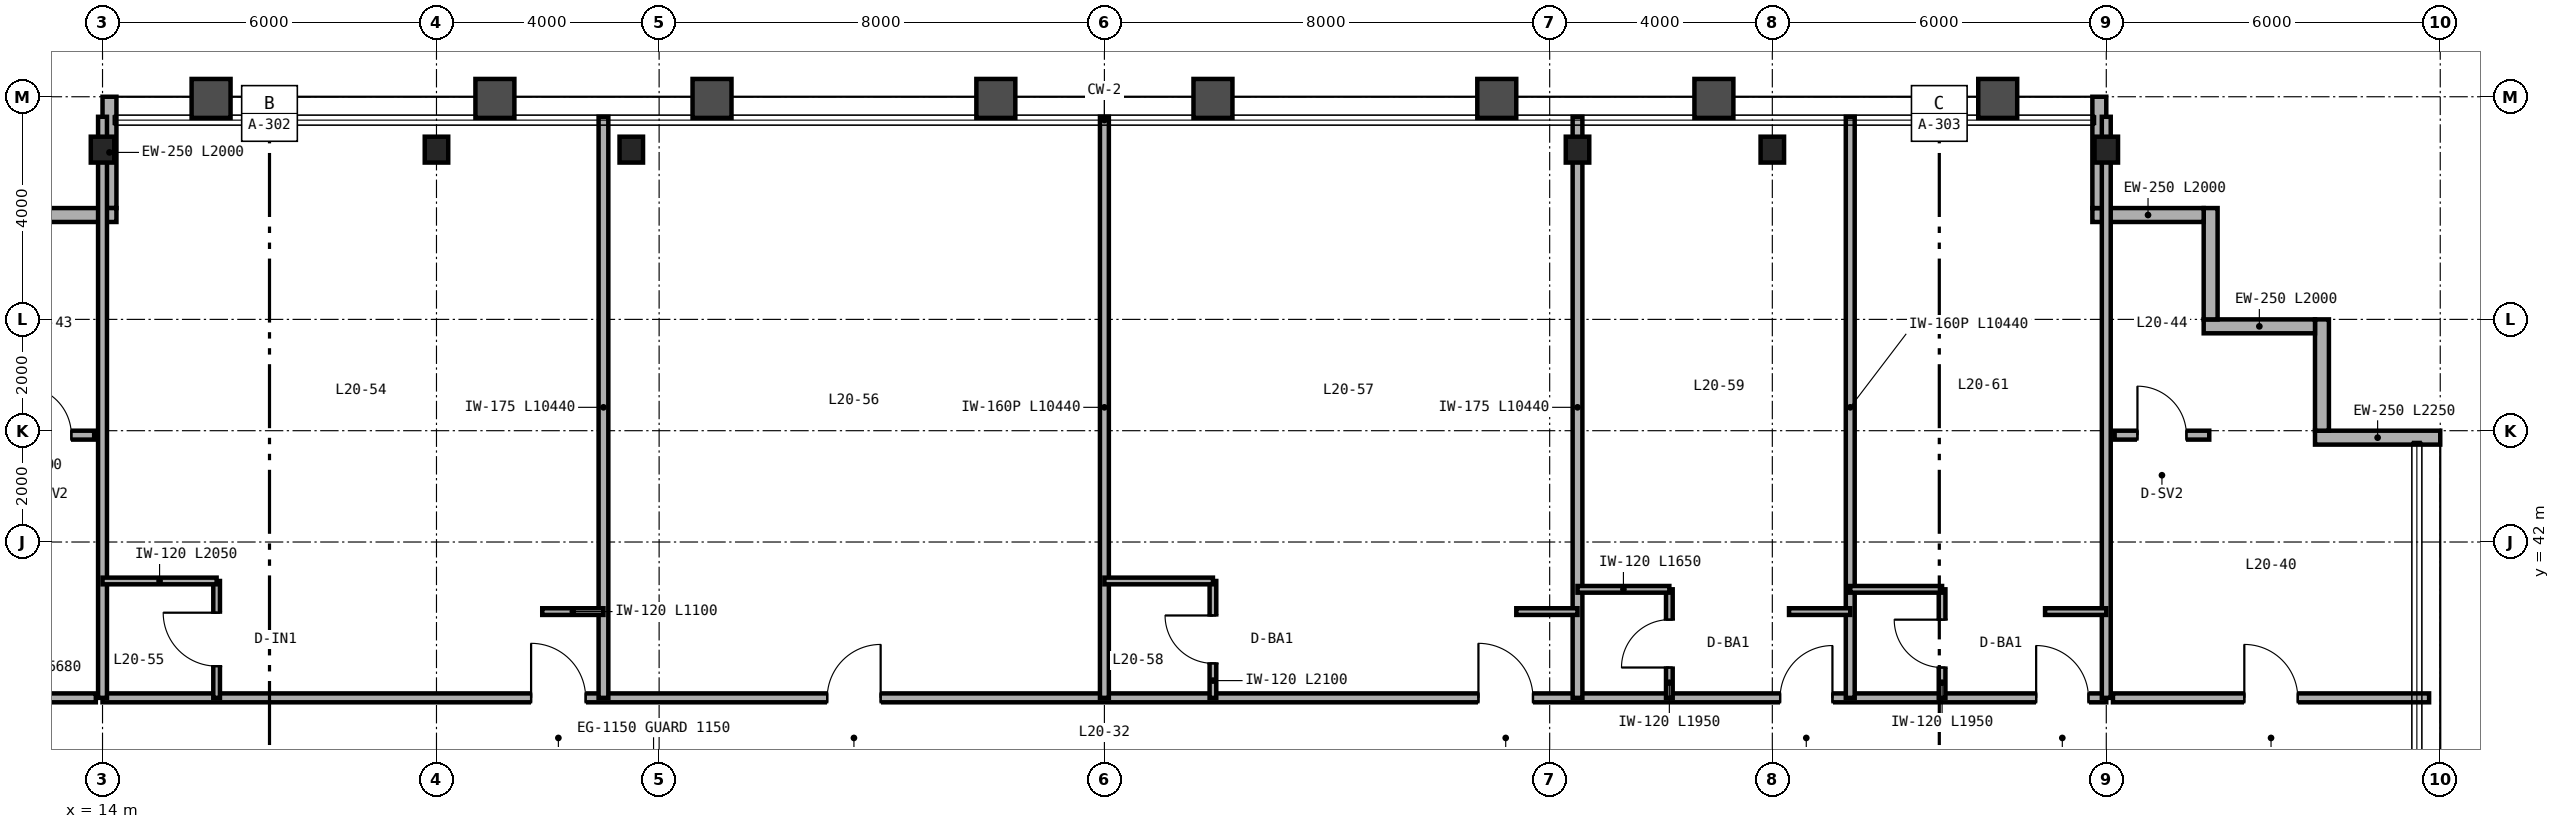
"""IFC4 building model, lengths in metres.
Left out: names, types, materials, properties, quantities, classifications, styles, units other than length and angle.
Written with IfcOpenShell. Run it as: python <this file> out.ifc"""

import sys

from ifc_helpers import new_model, si_unit, direction, frame, frame_2d, origin, origin_2d, place, context, subcontext, project, spatial, rectangle, i_section, extrude, source, transform, mapped, element, fill, save


model = new_model("IFC4")
c1 = context("Model", 3, precision=1e-05, world=origin(), true_north=direction((0.0, 1.0)))
c2 = subcontext(c1, "Body", "Model", "MODEL_VIEW")
j1 = project(units=[si_unit("LENGTHUNIT", "METRE"), si_unit("PLANEANGLEUNIT", "RADIAN")], contexts=[c1])
p1 = place(None, origin())
s1 = spatial("IfcSite", under=j1, at=p1, CompositionType="ELEMENT")
p2 = place(p1, origin())
s2 = spatial("IfcBuilding", under=s1, at=p2, CompositionType="ELEMENT")
p3 = place(p2, frame((0.0, 0.0, 81.6)))
s3 = spatial("IfcBuildingStorey", under=s2, at=p3, CompositionType="ELEMENT", Elevation=81.6)
m1 = source(origin(), c2, "Body", "SweptSolid", [
    extrude(i_section(OverallWidth=0.422, OverallDepth=0.465, WebThickness=0.045, FlangeThickness=0.073, FilletRadius=0.025, at=origin_2d()), origin(), (0.0, 0.0, 1.0), 3.28),
])
for number, where, z_axis, x_axis in (
    (1, (14.0, 49.05, 0.0), (0.0, 0.0, 1.0), (1.0, 0.0, 0.0)),
    (2, (20.0, 49.05, 0.0), (0.0, 0.0, 1.0), (1.0, 0.0, 0.0)),
    (3, (23.5, 49.05, 0.0), (0.0, 0.0, 1.0), (1.0, 0.0, 0.0)),
    (4, (40.5, 49.05, 0.0), (0.0, 0.0, 1.0), (1.0, 0.0, 0.0)),
    (5, (44.0, 49.05, 0.0), (0.0, 0.0, 1.0), (1.0, 0.0, 0.0)),
    (6, (50.0, 49.05, 0.0), (0.0, 0.0, 1.0), (1.0, 0.0, 0.0)),
):
    element("IfcColumn", number, at=place(p3, frame(where, z_axis=z_axis, x_axis=x_axis)), inside=s3, PredefinedType="COLUMN", context=c2, shape_type="MappedRepresentation", body=[
        mapped(m1, transform((0.0, 0.0, 0.0), scale=1.0)),
    ])
p4 = place(p3, frame((56.0, 43.875, 0.0), z_axis=(0.0, 0.0, 1.0), x_axis=(-1.0, 0.0, 0.0)))
e7 = element("IfcWall", 7, at=p4, inside=s3, PredefinedType="SOLIDWALL", context=c2, shape_type="SweptSolid", body=[
    extrude(rectangle(XDim=2.25, YDim=0.25, at=frame_2d((1.125, 0.0))), origin(), (0.0, 0.0, 1.0), 3.28),
])
for number, where, z_axis, x_axis in (
    (8, (53.875, 44.0, 0.0), (0.0, 0.0, 1.0), (0.0, 1.0, 0.0)),
    (9, (53.75, 45.875, 0.0), (0.0, 0.0, 1.0), (-1.0, 0.0, 0.0)),
    (10, (51.875, 46.0, 0.0), (0.0, 0.0, 1.0), (0.0, 1.0, 0.0)),
    (11, (51.75, 47.875, 0.0), (0.0, 0.0, 1.0), (-1.0, 0.0, 0.0)),
):
    element("IfcWall", number, at=place(p3, frame(where, z_axis=z_axis, x_axis=x_axis)), inside=s3, PredefinedType="SOLIDWALL", context=c2, shape_type="SweptSolid", body=[
        extrude(rectangle(XDim=2.0, YDim=0.25, at=frame_2d((1.0, 0.0))), origin(), (0.0, 0.0, 1.0), 3.28),
    ])
for number, where, z_axis, x_axis in (
    (12, (49.875, 48.0, 0.0), (0.0, 0.0, 1.0), (0.0, 1.0, 0.0)),
    (13, (14.125, 50.0, 0.0), (0.0, 0.0, 1.0), (0.0, -1.0, 0.0)),
):
    element("IfcWall", number, at=place(p3, frame(where, z_axis=z_axis, x_axis=x_axis)), inside=s3, PredefinedType="SOLIDWALL", context=c2, shape_type="SweptSolid", body=[
        extrude(rectangle(XDim=2.0, YDim=0.25, at=frame_2d((1.0, 0.0))), origin(), (0.0, 0.0, 1.0), 2.587),
    ])
p5 = place(p3, frame((14.25, 47.875, 0.0), z_axis=(0.0, 0.0, 1.0), x_axis=(-1.0, 0.0, 0.0)))
e14 = element("IfcWall", 14, at=p5, inside=s3, PredefinedType="SOLIDWALL", context=c2, shape_type="SweptSolid", body=[
    extrude(rectangle(XDim=2.0, YDim=0.25, at=frame_2d((1.0, 0.0))), origin(), (0.0, 0.0, 1.0), 3.28),
])
p6 = place(p3, frame((8.2, 39.2, 0.0), z_axis=(0.0, 0.0, 1.0), x_axis=(1.0, 0.0, 0.0)))
e15 = element("IfcWall", 15, at=p6, inside=s3, PredefinedType="PARTITIONING", context=c2, shape_type="SweptSolid", body=[
    extrude(rectangle(XDim=5.68, YDim=0.16, at=frame_2d((2.84, 0.0))), origin(), (0.0, 0.0, 1.0), 3.28),
])
p7 = place(p6, frame((2.36, 0.0, 0.0)))
e16 = element("IfcOpeningElement", 16, at=p7, cuts=e15, PredefinedType="OPENING", context=c2, shape_type="SweptSolid", body=[
    extrude(rectangle(XDim=0.96, YDim=2.15, at=frame_2d((0.48, 1.075))), frame((0.0, 0.09, 0.0), z_axis=(0.0, -1.0, 0.0), x_axis=(1.0, 0.0, 0.0)), (0.0, 0.0, 1.0), 0.18),
])
p8 = place(p3, frame((50.12, 39.2, 0.0), z_axis=(0.0, 0.0, 1.0), x_axis=(1.0, 0.0, 0.0)))
e17 = element("IfcWall", 17, at=p8, inside=s3, PredefinedType="PARTITIONING", context=c2, shape_type="SweptSolid", body=[
    extrude(rectangle(XDim=5.68, YDim=0.16, at=frame_2d((2.84, 0.0))), origin(), (0.0, 0.0, 1.0), 3.28),
])
p9 = place(p8, frame((2.36, 0.0, 0.0)))
e18 = element("IfcOpeningElement", 18, at=p9, cuts=e17, PredefinedType="OPENING", context=c2, shape_type="SweptSolid", body=[
    extrude(rectangle(XDim=0.96, YDim=2.15, at=frame_2d((0.48, 1.075))), frame((0.0, 0.09, 0.0), z_axis=(0.0, -1.0, 0.0), x_axis=(1.0, 0.0, 0.0)), (0.0, 0.0, 1.0), 0.18),
])
p10 = place(p3, frame((12.15, 43.92, 0.0), z_axis=(0.0, 0.0, 1.0), x_axis=(1.0, 0.0, 0.0)))
e19 = element("IfcWall", 19, at=p10, inside=s3, PredefinedType="PARTITIONING", context=c2, shape_type="SweptSolid", body=[
    extrude(rectangle(XDim=1.7, YDim=0.16, at=frame_2d((0.85, 0.0))), origin(), (0.0, 0.0, 1.0), 3.28),
])
p11 = place(p10, frame((0.41, 0.0, 0.0)))
e20 = element("IfcOpeningElement", 20, at=p11, cuts=e19, PredefinedType="OPENING", context=c2, shape_type="SweptSolid", body=[
    extrude(rectangle(XDim=0.88, YDim=2.15, at=frame_2d((0.44, 1.075))), frame((0.0, 0.09, 0.0), z_axis=(0.0, -1.0, 0.0), x_axis=(1.0, 0.0, 0.0)), (0.0, 0.0, 1.0), 0.18),
])
p12 = place(p3, frame((50.15, 43.92, 0.0), z_axis=(0.0, 0.0, 1.0), x_axis=(1.0, 0.0, 0.0)))
e21 = element("IfcWall", 21, at=p12, inside=s3, PredefinedType="PARTITIONING", context=c2, shape_type="SweptSolid", body=[
    extrude(rectangle(XDim=1.7, YDim=0.16, at=frame_2d((0.85, 0.0))), origin(), (0.0, 0.0, 1.0), 3.28),
])
p13 = place(p12, frame((0.41, 0.0, 0.0)))
e22 = element("IfcOpeningElement", 22, at=p13, cuts=e21, PredefinedType="OPENING", context=c2, shape_type="SweptSolid", body=[
    extrude(rectangle(XDim=0.88, YDim=2.15, at=frame_2d((0.44, 1.075))), frame((0.0, 0.09, 0.0), z_axis=(0.0, -1.0, 0.0), x_axis=(1.0, 0.0, 0.0)), (0.0, 0.0, 1.0), 0.18),
])
p14 = place(p3, frame((14.0, 39.2, 0.0), z_axis=(0.0, 0.0, 1.0), x_axis=(1.0, 0.0, 0.0)))
e23 = element("IfcWall", 23, at=p14, inside=s3, PredefinedType="PARTITIONING", context=c2, shape_type="SweptSolid", body=[
    extrude(rectangle(XDim=36.0, YDim=0.16, at=frame_2d((18.0, 0.0))), origin(), (0.0, 0.0, 1.0), 2.501),
])
p15 = place(p14, frame((7.7, 0.0, 0.0)))
e24 = element("IfcOpeningElement", 24, at=p15, cuts=e23, PredefinedType="OPENING", context=c2, shape_type="SweptSolid", body=[
    extrude(rectangle(XDim=0.98, YDim=2.2, at=frame_2d((0.49, 1.1))), frame((0.0, 0.09, 0.0), z_axis=(0.0, -1.0, 0.0), x_axis=(1.0, 0.0, 0.0)), (0.0, 0.0, 1.0), 0.18),
])
p16 = place(p14, frame((13.02, 0.0, 0.0)))
e25 = element("IfcOpeningElement", 25, at=p16, cuts=e23, PredefinedType="OPENING", context=c2, shape_type="SweptSolid", body=[
    extrude(rectangle(XDim=0.96, YDim=2.15, at=frame_2d((0.48, 1.075))), frame((0.0, 0.09, 0.0), z_axis=(0.0, -1.0, 0.0), x_axis=(1.0, 0.0, 0.0)), (0.0, 0.0, 1.0), 0.18),
])
p17 = place(p14, frame((24.72, 0.0, 0.0)))
e26 = element("IfcOpeningElement", 26, at=p17, cuts=e23, PredefinedType="OPENING", context=c2, shape_type="SweptSolid", body=[
    extrude(rectangle(XDim=0.98, YDim=2.2, at=frame_2d((0.49, 1.1))), frame((0.0, 0.09, 0.0), z_axis=(0.0, -1.0, 0.0), x_axis=(1.0, 0.0, 0.0)), (0.0, 0.0, 1.0), 0.18),
])
p18 = place(p14, frame((30.14, 0.0, 0.0)))
e27 = element("IfcOpeningElement", 27, at=p18, cuts=e23, PredefinedType="OPENING", context=c2, shape_type="SweptSolid", body=[
    extrude(rectangle(XDim=0.94, YDim=2.15, at=frame_2d((0.47, 1.075))), frame((0.0, 0.09, 0.0), z_axis=(0.0, -1.0, 0.0), x_axis=(1.0, 0.0, 0.0)), (0.0, 0.0, 1.0), 0.18),
])
p19 = place(p14, frame((34.74, 0.0, 0.0)))
e28 = element("IfcOpeningElement", 28, at=p19, cuts=e23, PredefinedType="OPENING", context=c2, shape_type="SweptSolid", body=[
    extrude(rectangle(XDim=0.94, YDim=2.15, at=frame_2d((0.47, 1.075))), frame((0.0, 0.09, 0.0), z_axis=(0.0, -1.0, 0.0), x_axis=(1.0, 0.0, 0.0)), (0.0, 0.0, 1.0), 0.18),
])
for number, where, z_axis, x_axis in (
    (29, (14.0, 39.2, 0.0), (0.0, 0.0, 1.0), (0.0, 1.0, 0.0)),
    (30, (50.0, 39.2, 0.0), (0.0, 0.0, 1.0), (0.0, 1.0, 0.0)),
):
    element("IfcWall", number, at=place(p3, frame(where, z_axis=z_axis, x_axis=x_axis)), inside=s3, PredefinedType="PARTITIONING", context=c2, shape_type="SweptSolid", body=[
        extrude(rectangle(XDim=10.44, YDim=0.16, at=frame_2d((5.22, 0.0))), origin(), (0.0, 0.0, 1.0), 2.587),
    ])
p20 = place(p3, frame((23.0, 39.2, 0.0), z_axis=(0.0, 0.0, 1.0), x_axis=(0.0, 1.0, 0.0)))
e31 = element("IfcWall", 31, at=p20, inside=s3, PredefinedType="PARTITIONING", context=c2, shape_type="SweptSolid", body=[
    extrude(rectangle(XDim=10.44, YDim=0.175, at=frame_2d((5.22, 0.0))), origin(), (0.0, 0.0, 1.0), 2.743),
])
p21 = place(p3, frame((16.05, 39.2, 0.0), z_axis=(0.0, 0.0, 1.0), x_axis=(0.0, 1.0, 0.0)))
e32 = element("IfcWall", 32, at=p21, inside=s3, PredefinedType="PARTITIONING", context=c2, shape_type="SweptSolid", body=[
    extrude(rectangle(XDim=2.1, YDim=0.12, at=frame_2d((1.05, 0.0))), origin(), (0.0, 0.0, 1.0), 3.28),
])
p22 = place(p21, frame((0.57, 0.0, 0.0)))
e33 = element("IfcOpeningElement", 33, at=p22, cuts=e32, PredefinedType="OPENING", context=c2, shape_type="SweptSolid", body=[
    extrude(rectangle(XDim=0.96, YDim=2.15, at=frame_2d((0.48, 1.075))), frame((0.0, 0.07, 0.0), z_axis=(0.0, -1.0, 0.0), x_axis=(1.0, 0.0, 0.0)), (0.0, 0.0, 1.0), 0.14),
])
p23 = place(p3, frame((14.0, 41.3, 0.0), z_axis=(0.0, 0.0, 1.0), x_axis=(1.0, 0.0, 0.0)))
e34 = element("IfcWall", 34, at=p23, inside=s3, PredefinedType="PARTITIONING", context=c2, shape_type="SweptSolid", body=[
    extrude(rectangle(XDim=2.05, YDim=0.12, at=frame_2d((1.025, 0.0))), origin(), (0.0, 0.0, 1.0), 3.28),
])
p24 = place(p3, frame((21.9, 40.75, 0.0), z_axis=(0.0, 0.0, 1.0), x_axis=(1.0, 0.0, 0.0)))
e35 = element("IfcWall", 35, at=p24, inside=s3, PredefinedType="PARTITIONING", context=c2, shape_type="SweptSolid", body=[
    extrude(rectangle(XDim=1.1, YDim=0.12, at=frame_2d((0.55, 0.0))), origin(), (0.0, 0.0, 1.0), 3.28),
])
p25 = place(p3, frame((32.0, 39.2, 0.0), z_axis=(0.0, 0.0, 1.0), x_axis=(0.0, 1.0, 0.0)))
e36 = element("IfcWall", 36, at=p25, inside=s3, PredefinedType="PARTITIONING", context=c2, shape_type="SweptSolid", body=[
    extrude(rectangle(XDim=10.44, YDim=0.16, at=frame_2d((5.22, 0.0))), origin(), (0.0, 0.0, 1.0), 2.36),
])
p26 = place(p3, frame((40.5, 39.2, 0.0), z_axis=(0.0, 0.0, 1.0), x_axis=(0.0, 1.0, 0.0)))
e37 = element("IfcWall", 37, at=p26, inside=s3, PredefinedType="PARTITIONING", context=c2, shape_type="SweptSolid", body=[
    extrude(rectangle(XDim=10.44, YDim=0.175, at=frame_2d((5.22, 0.0))), origin(), (0.0, 0.0, 1.0), 2.36),
])
p27 = place(p3, frame((33.95, 39.2, 0.0), z_axis=(0.0, 0.0, 1.0), x_axis=(0.0, 1.0, 0.0)))
e38 = element("IfcWall", 38, at=p27, inside=s3, PredefinedType="PARTITIONING", context=c2, shape_type="SweptSolid", body=[
    extrude(rectangle(XDim=2.1, YDim=0.12, at=frame_2d((1.05, 0.0))), origin(), (0.0, 0.0, 1.0), 3.28),
])
p28 = place(p27, frame((0.62, 0.0, 0.0)))
e39 = element("IfcOpeningElement", 39, at=p28, cuts=e38, PredefinedType="OPENING", context=c2, shape_type="SweptSolid", body=[
    extrude(rectangle(XDim=0.86, YDim=2.1, at=frame_2d((0.43, 1.05))), frame((0.0, 0.07, 0.0), z_axis=(0.0, -1.0, 0.0), x_axis=(1.0, 0.0, 0.0)), (0.0, 0.0, 1.0), 0.14),
])
p29 = place(p3, frame((32.0, 41.3, 0.0), z_axis=(0.0, 0.0, 1.0), x_axis=(1.0, 0.0, 0.0)))
e40 = element("IfcWall", 40, at=p29, inside=s3, PredefinedType="PARTITIONING", context=c2, shape_type="SweptSolid", body=[
    extrude(rectangle(XDim=1.95, YDim=0.12, at=frame_2d((0.975, 0.0))), origin(), (0.0, 0.0, 1.0), 3.28),
])
p30 = place(p3, frame((39.4, 40.75, 0.0), z_axis=(0.0, 0.0, 1.0), x_axis=(1.0, 0.0, 0.0)))
e41 = element("IfcWall", 41, at=p30, inside=s3, PredefinedType="PARTITIONING", context=c2, shape_type="SweptSolid", body=[
    extrude(rectangle(XDim=1.1, YDim=0.12, at=frame_2d((0.55, 0.0))), origin(), (0.0, 0.0, 1.0), 2.501),
])
p31 = place(p3, frame((45.4, 39.2, 0.0), z_axis=(0.0, 0.0, 1.0), x_axis=(0.0, 1.0, 0.0)))
e42 = element("IfcWall", 42, at=p31, inside=s3, PredefinedType="PARTITIONING", context=c2, shape_type="SweptSolid", body=[
    extrude(rectangle(XDim=10.44, YDim=0.16, at=frame_2d((5.22, 0.0))), origin(), (0.0, 0.0, 1.0), 2.587),
])
p32 = place(p3, frame((42.15, 39.2, 0.0), z_axis=(0.0, 0.0, 1.0), x_axis=(0.0, 1.0, 0.0)))
e43 = element("IfcWall", 43, at=p32, inside=s3, PredefinedType="PARTITIONING", context=c2, shape_type="SweptSolid", body=[
    extrude(rectangle(XDim=1.95, YDim=0.12, at=frame_2d((0.975, 0.0))), origin(), (0.0, 0.0, 1.0), 3.28),
])
p33 = place(p32, frame((0.545, 0.0, 0.0)))
e44 = element("IfcOpeningElement", 44, at=p33, cuts=e43, PredefinedType="OPENING", context=c2, shape_type="SweptSolid", body=[
    extrude(rectangle(XDim=0.86, YDim=2.1, at=frame_2d((0.43, 1.05))), frame((0.0, 0.07, 0.0), z_axis=(0.0, -1.0, 0.0), x_axis=(1.0, 0.0, 0.0)), (0.0, 0.0, 1.0), 0.14),
])
p34 = place(p3, frame((40.5, 41.15, 0.0), z_axis=(0.0, 0.0, 1.0), x_axis=(1.0, 0.0, 0.0)))
e45 = element("IfcWall", 45, at=p34, inside=s3, PredefinedType="PARTITIONING", context=c2, shape_type="SweptSolid", body=[
    extrude(rectangle(XDim=1.65, YDim=0.12, at=frame_2d((0.825, 0.0))), origin(), (0.0, 0.0, 1.0), 2.501),
])
p35 = place(p3, frame((44.3, 40.75, 0.0), z_axis=(0.0, 0.0, 1.0), x_axis=(1.0, 0.0, 0.0)))
e46 = element("IfcWall", 46, at=p35, inside=s3, PredefinedType="PARTITIONING", context=c2, shape_type="SweptSolid", body=[
    extrude(rectangle(XDim=1.1, YDim=0.12, at=frame_2d((0.55, 0.0))), origin(), (0.0, 0.0, 1.0), 3.28),
])
p36 = place(p3, frame((47.05, 39.2, 0.0), z_axis=(0.0, 0.0, 1.0), x_axis=(0.0, 1.0, 0.0)))
e47 = element("IfcWall", 47, at=p36, inside=s3, PredefinedType="PARTITIONING", context=c2, shape_type="SweptSolid", body=[
    extrude(rectangle(XDim=1.95, YDim=0.12, at=frame_2d((0.975, 0.0))), origin(), (0.0, 0.0, 1.0), 3.28),
])
p37 = place(p36, frame((0.545, 0.0, 0.0)))
e48 = element("IfcOpeningElement", 48, at=p37, cuts=e47, PredefinedType="OPENING", context=c2, shape_type="SweptSolid", body=[
    extrude(rectangle(XDim=0.86, YDim=2.1, at=frame_2d((0.43, 1.05))), frame((0.0, 0.07, 0.0), z_axis=(0.0, -1.0, 0.0), x_axis=(1.0, 0.0, 0.0)), (0.0, 0.0, 1.0), 0.14),
])
p38 = place(p3, frame((45.4, 41.15, 0.0), z_axis=(0.0, 0.0, 1.0), x_axis=(1.0, 0.0, 0.0)))
e49 = element("IfcWall", 49, at=p38, inside=s3, PredefinedType="PARTITIONING", context=c2, shape_type="SweptSolid", body=[
    extrude(rectangle(XDim=1.65, YDim=0.12, at=frame_2d((0.825, 0.0))), origin(), (0.0, 0.0, 1.0), 3.28),
])
p39 = place(p3, frame((48.9, 40.75, 0.0), z_axis=(0.0, 0.0, 1.0), x_axis=(1.0, 0.0, 0.0)))
e50 = element("IfcWall", 50, at=p39, inside=s3, PredefinedType="PARTITIONING", context=c2, shape_type="SweptSolid", body=[
    extrude(rectangle(XDim=1.1, YDim=0.12, at=frame_2d((0.55, 0.0))), origin(), (0.0, 0.0, 1.0), 3.28),
])
m2 = source(origin(), c2, "Body", "SweptSolid", [
    extrude(rectangle(XDim=0.96, YDim=2.15, at=frame_2d((0.48, 1.075))), frame((0.0, 0.025, 0.0), z_axis=(0.0, -1.0, 0.0), x_axis=(1.0, 0.0, 0.0)), (0.0, 0.0, 1.0), 0.05),
])
p40 = place(p9, origin())
e51 = element("IfcDoor", 51, at=p40, inside=s3, OperationType="SINGLE_SWING_LEFT", PredefinedType="DOOR", context=c2, shape_type="MappedRepresentation", body=[
    mapped(m2, transform((0.0, 0.0, 0.0), scale=1.0)),
])
fill(e18, e51)
m3 = source(origin(), c2, "Body", "SweptSolid", [
    extrude(rectangle(XDim=0.88, YDim=2.15, at=frame_2d((0.44, 1.075))), frame((0.0, 0.025, 0.0), z_axis=(0.0, -1.0, 0.0), x_axis=(1.0, 0.0, 0.0)), (0.0, 0.0, 1.0), 0.05),
])
p41 = place(p11, origin())
e52 = element("IfcDoor", 52, at=p41, inside=s3, OperationType="SINGLE_SWING_LEFT", PredefinedType="DOOR", context=c2, shape_type="MappedRepresentation", body=[
    mapped(m3, transform((0.0, 0.0, 0.0), scale=1.0)),
])
fill(e20, e52)
p42 = place(p13, origin())
e53 = element("IfcDoor", 53, at=p42, inside=s3, OperationType="SINGLE_SWING_LEFT", PredefinedType="DOOR", context=c2, shape_type="MappedRepresentation", body=[
    mapped(m3, transform((0.0, 0.0, 0.0), scale=1.0)),
])
fill(e22, e53)
p43 = place(p22, origin())
e54 = element("IfcDoor", 54, at=p43, inside=s3, OperationType="SINGLE_SWING_RIGHT", PredefinedType="DOOR", context=c2, shape_type="MappedRepresentation", body=[
    mapped(m2, transform((0.0, 0.0, 0.0), scale=1.0)),
])
fill(e33, e54)
m4 = source(origin(), c2, "Body", "SweptSolid", [
    extrude(rectangle(XDim=0.86, YDim=2.1, at=frame_2d((0.43, 1.05))), frame((0.0, 0.025, 0.0), z_axis=(0.0, -1.0, 0.0), x_axis=(1.0, 0.0, 0.0)), (0.0, 0.0, 1.0), 0.05),
])
p44 = place(p28, origin())
e55 = element("IfcDoor", 55, at=p44, inside=s3, OperationType="SINGLE_SWING_RIGHT", PredefinedType="DOOR", context=c2, shape_type="MappedRepresentation", body=[
    mapped(m4, transform((0.0, 0.0, 0.0), scale=1.0)),
])
fill(e39, e55)
p45 = place(p33, origin())
e56 = element("IfcDoor", 56, at=p45, inside=s3, OperationType="SINGLE_SWING_LEFT", PredefinedType="DOOR", context=c2, shape_type="MappedRepresentation", body=[
    mapped(m4, transform((0.0, 0.0, 0.0), scale=1.0)),
])
fill(e44, e56)
p46 = place(p37, origin())
e57 = element("IfcDoor", 57, at=p46, inside=s3, OperationType="SINGLE_SWING_RIGHT", PredefinedType="DOOR", context=c2, shape_type="MappedRepresentation", body=[
    mapped(m4, transform((0.0, 0.0, 0.0), scale=1.0)),
])
fill(e48, e57)
m5 = source(origin(), c2, "Body", "SweptSolid", [
    extrude(rectangle(XDim=0.98, YDim=2.2, at=frame_2d((0.49, 1.1))), frame((0.0, 0.025, 0.0), z_axis=(0.0, -1.0, 0.0), x_axis=(1.0, 0.0, 0.0)), (0.0, 0.0, 1.0), 0.05),
])
p47 = place(p15, origin())
e58 = element("IfcDoor", 58, at=p47, inside=s3, OperationType="SINGLE_SWING_LEFT", PredefinedType="DOOR", context=c2, shape_type="MappedRepresentation", body=[
    mapped(m5, transform((0.0, 0.0, 0.0), scale=1.0)),
])
fill(e24, e58)
p48 = place(p16, origin())
e59 = element("IfcDoor", 59, at=p48, inside=s3, OperationType="SINGLE_SWING_RIGHT", PredefinedType="DOOR", context=c2, shape_type="MappedRepresentation", body=[
    mapped(m2, transform((0.0, 0.0, 0.0), scale=1.0)),
])
fill(e25, e59)
p49 = place(p17, origin())
e60 = element("IfcDoor", 60, at=p49, inside=s3, OperationType="SINGLE_SWING_LEFT", PredefinedType="DOOR", context=c2, shape_type="MappedRepresentation", body=[
    mapped(m5, transform((0.0, 0.0, 0.0), scale=1.0)),
])
fill(e26, e60)
m6 = source(origin(), c2, "Body", "SweptSolid", [
    extrude(rectangle(XDim=0.94, YDim=2.15, at=frame_2d((0.47, 1.075))), frame((0.0, 0.025, 0.0), z_axis=(0.0, -1.0, 0.0), x_axis=(1.0, 0.0, 0.0)), (0.0, 0.0, 1.0), 0.05),
])
p50 = place(p18, origin())
e61 = element("IfcDoor", 61, at=p50, inside=s3, OperationType="SINGLE_SWING_RIGHT", PredefinedType="DOOR", context=c2, shape_type="MappedRepresentation", body=[
    mapped(m6, transform((0.0, 0.0, 0.0), scale=1.0)),
])
fill(e27, e61)
p51 = place(p19, origin())
e62 = element("IfcDoor", 62, at=p51, inside=s3, OperationType="SINGLE_SWING_LEFT", PredefinedType="DOOR", context=c2, shape_type="MappedRepresentation", body=[
    mapped(m6, transform((0.0, 0.0, 0.0), scale=1.0)),
])
fill(e28, e62)
save(model, sys.argv[1])
